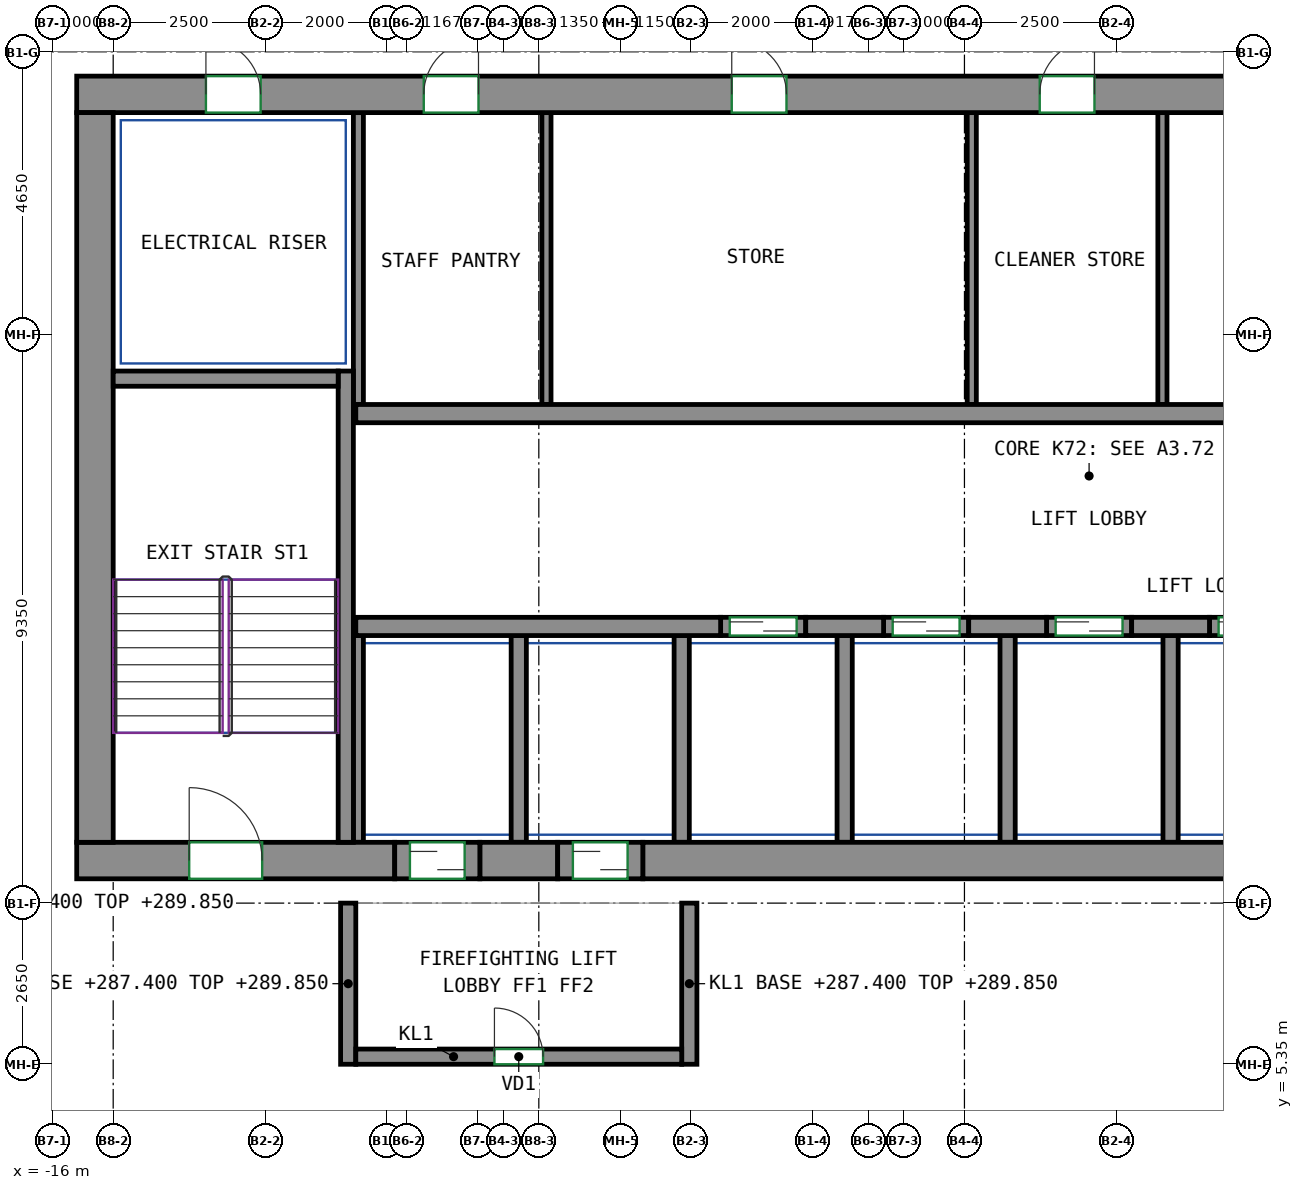
"""IFC4 building model, lengths in metres.
Left out: names, types, materials, properties, quantities, classifications, styles, units other than length and angle.
Written with IfcOpenShell. Run it as: python <this file> out.ifc"""

import sys

from ifc_helpers import new_model, si_unit, direction, frame, frame_2d, origin, place, context, subcontext, project, spatial, rectangle, extrude, source, transform, mapped, element, fill, save


model = new_model("IFC4")
c1 = context("Model", 3, precision=1e-05, world=origin(), true_north=direction((0.0, 1.0)))
c2 = subcontext(c1, "Body", "Model", "MODEL_VIEW")
j1 = project(units=[si_unit("LENGTHUNIT", "METRE"), si_unit("PLANEANGLEUNIT", "RADIAN")], contexts=[c1])
p1 = place(None, origin())
s1 = spatial("IfcSite", under=j1, at=p1, CompositionType="ELEMENT")
p2 = place(p1, origin())
s2 = spatial("IfcBuilding", under=s1, at=p2, CompositionType="ELEMENT")
p3 = place(p2, frame((0.0, 0.0, 287.4)))
s3 = spatial("IfcBuildingStorey", under=s2, at=p3, CompositionType="ELEMENT", Elevation=287.4)
m1 = source(origin(), c2, "Body", "SweptSolid", [
    extrude(rectangle(XDim=5.23, YDim=0.6, at=frame_2d((2.615, 0.0))), origin(), (0.0, 0.0, 1.0), 3.0),
])
p4 = place(p3, frame((-15.6, 8.7, 0.0), z_axis=(0.0, 0.0, 1.0), x_axis=(1.0, 0.0, 0.0)))
e1 = element("IfcWall", 1, at=p4, inside=s3, PredefinedType="SHEAR", context=c2, shape_type="MappedRepresentation", body=[
    mapped(m1, transform((0.0, 0.0, 0.0))),
])
p5 = place(p4, frame((1.85, 0.0, 0.0)))
e2 = element("IfcOpeningElement", 2, at=p5, cuts=e1, PredefinedType="OPENING", context=c2, shape_type="SweptSolid", body=[
    extrude(rectangle(XDim=1.2, YDim=2.1, at=frame_2d((0.6, 1.05))), frame((0.0, 0.31, 0.0), z_axis=(0.0, -1.0, 0.0), x_axis=(1.0, 0.0, 0.0)), (0.0, 0.0, 1.0), 0.62),
])
m2 = source(origin(), c2, "Body", "SweptSolid", [
    extrude(rectangle(XDim=1.28, YDim=0.6, at=frame_2d((0.64, 0.0))), origin(), (0.0, 0.0, 1.0), 3.0),
])
p6 = place(p3, frame((-8.97, 8.7, 0.0), z_axis=(0.0, 0.0, 1.0), x_axis=(1.0, 0.0, 0.0)))
e3 = element("IfcWall", 3, at=p6, inside=s3, PredefinedType="SHEAR", context=c2, shape_type="MappedRepresentation", body=[
    mapped(m2, transform((0.0, 0.0, 0.0))),
])
m3 = source(origin(), c2, "Body", "SweptSolid", [
    extrude(rectangle(XDim=14.18, YDim=0.6, at=frame_2d((7.09, 0.0))), origin(), (0.0, 0.0, 1.0), 3.0),
])
p7 = place(p3, frame((-6.29, 8.7, 0.0), z_axis=(0.0, 0.0, 1.0), x_axis=(1.0, 0.0, 0.0)))
e4 = element("IfcWall", 4, at=p7, inside=s3, PredefinedType="SHEAR", context=c2, shape_type="MappedRepresentation", body=[
    mapped(m3, transform((0.0, 0.0, 0.0))),
])
m4 = source(origin(), c2, "Body", "SweptSolid", [
    extrude(rectangle(XDim=33.3, YDim=0.6, at=frame_2d((16.65, 0.0))), origin(), (0.0, 0.0, 1.0), 3.0),
])
p8 = place(p3, frame((-15.6, 21.3, 0.0), z_axis=(0.0, 0.0, 1.0), x_axis=(1.0, 0.0, 0.0)))
e5 = element("IfcWall", 5, at=p8, inside=s3, PredefinedType="SHEAR", context=c2, shape_type="MappedRepresentation", body=[
    mapped(m4, transform((0.0, 0.0, 0.0))),
])
p9 = place(p8, frame((5.708, 0.0, 0.0)))
e6 = element("IfcOpeningElement", 6, at=p9, cuts=e5, PredefinedType="OPENING", context=c2, shape_type="SweptSolid", body=[
    extrude(rectangle(XDim=0.9, YDim=2.1, at=frame_2d((0.45, 1.05))), frame((0.0, 0.31, 0.0), z_axis=(0.0, -1.0, 0.0), x_axis=(1.0, 0.0, 0.0)), (0.0, 0.0, 1.0), 0.62),
])
p10 = place(p8, frame((10.773, 0.0, 0.0)))
e7 = element("IfcOpeningElement", 7, at=p10, cuts=e5, PredefinedType="OPENING", context=c2, shape_type="SweptSolid", body=[
    extrude(rectangle(XDim=0.9, YDim=2.1, at=frame_2d((0.45, 1.05))), frame((0.0, 0.31, 0.0), z_axis=(0.0, -1.0, 0.0), x_axis=(1.0, 0.0, 0.0)), (0.0, 0.0, 1.0), 0.62),
])
p11 = place(p8, frame((15.838, 0.0, 0.0)))
e8 = element("IfcOpeningElement", 8, at=p11, cuts=e5, PredefinedType="OPENING", context=c2, shape_type="SweptSolid", body=[
    extrude(rectangle(XDim=0.9, YDim=2.1, at=frame_2d((0.45, 1.05))), frame((0.0, 0.31, 0.0), z_axis=(0.0, -1.0, 0.0), x_axis=(1.0, 0.0, 0.0)), (0.0, 0.0, 1.0), 0.62),
])
p12 = place(p8, frame((21.493, 0.0, 0.0)))
e9 = element("IfcOpeningElement", 9, at=p12, cuts=e5, PredefinedType="OPENING", context=c2, shape_type="SweptSolid", body=[
    extrude(rectangle(XDim=0.9, YDim=2.1, at=frame_2d((0.45, 1.05))), frame((0.0, 0.31, 0.0), z_axis=(0.0, -1.0, 0.0), x_axis=(1.0, 0.0, 0.0)), (0.0, 0.0, 1.0), 0.62),
])
p13 = place(p8, frame((26.92, 0.0, 0.0)))
e10 = element("IfcOpeningElement", 10, at=p13, cuts=e5, PredefinedType="OPENING", context=c2, shape_type="SweptSolid", body=[
    extrude(rectangle(XDim=0.9, YDim=2.1, at=frame_2d((0.45, 1.05))), frame((0.0, 0.31, 0.0), z_axis=(0.0, -1.0, 0.0), x_axis=(1.0, 0.0, 0.0)), (0.0, 0.0, 1.0), 0.62),
])
p14 = place(p8, frame((2.125, 0.0, 0.0)))
e11 = element("IfcOpeningElement", 11, at=p14, cuts=e5, PredefinedType="OPENING", context=c2, shape_type="SweptSolid", body=[
    extrude(rectangle(XDim=0.9, YDim=2.1, at=frame_2d((0.45, 1.05))), frame((0.0, 0.31, 0.0), z_axis=(0.0, -1.0, 0.0), x_axis=(1.0, 0.0, 0.0)), (0.0, 0.0, 1.0), 0.62),
])
p15 = place(p8, frame((30.275, 0.0, 0.0)))
e12 = element("IfcOpeningElement", 12, at=p15, cuts=e5, PredefinedType="OPENING", context=c2, shape_type="SweptSolid", body=[
    extrude(rectangle(XDim=0.9, YDim=2.1, at=frame_2d((0.45, 1.05))), frame((0.0, 0.31, 0.0), z_axis=(0.0, -1.0, 0.0), x_axis=(1.0, 0.0, 0.0)), (0.0, 0.0, 1.0), 0.62),
])
m5 = source(origin(), c2, "Body", "SweptSolid", [
    extrude(rectangle(XDim=12.0, YDim=0.6, at=frame_2d((6.0, 0.0))), origin(), (0.0, 0.0, 1.0), 3.0),
])
p16 = place(p3, frame((-15.3, 9.0, 0.0), z_axis=(0.0, 0.0, 1.0), x_axis=(0.0, 1.0, 0.0)))
e13 = element("IfcWall", 13, at=p16, inside=s3, PredefinedType="SHEAR", context=c2, shape_type="MappedRepresentation", body=[
    mapped(m5, transform((0.0, 0.0, 0.0))),
])
m6 = source(origin(), c2, "Body", "SweptSolid", [
    extrude(rectangle(XDim=7.75, YDim=0.25, at=frame_2d((3.875, 0.0))), origin(), (0.0, 0.0, 1.0), 3.0),
])
p17 = place(p3, frame((-11.175, 9.0, 0.0), z_axis=(0.0, 0.0, 1.0), x_axis=(0.0, 1.0, 0.0)))
e14 = element("IfcWall", 14, at=p17, inside=s3, PredefinedType="SHEAR", context=c2, shape_type="MappedRepresentation", body=[
    mapped(m6, transform((0.0, 0.0, 0.0))),
])
m7 = source(origin(), c2, "Body", "SweptSolid", [
    extrude(rectangle(XDim=3.7, YDim=0.25, at=frame_2d((1.85, 0.0))), origin(), (0.0, 0.0, 1.0), 3.0),
])
p18 = place(p3, frame((-15.0, 16.625, 0.0), z_axis=(0.0, 0.0, 1.0), x_axis=(1.0, 0.0, 0.0)))
e15 = element("IfcWall", 15, at=p18, inside=s3, PredefinedType="SHEAR", context=c2, shape_type="MappedRepresentation", body=[
    mapped(m7, transform((0.0, 0.0, 0.0))),
])
m8 = source(origin(), c2, "Body", "SweptSolid", [
    extrude(rectangle(XDim=6.0, YDim=0.3, at=frame_2d((3.0, 0.0))), origin(), (0.0, 0.0, 1.0), 3.0),
])
p19 = place(p3, frame((-11.01, 12.55, 0.0), z_axis=(0.0, 0.0, 1.0), x_axis=(1.0, 0.0, 0.0)))
e16 = element("IfcWall", 16, at=p19, inside=s3, PredefinedType="SHEAR", context=c2, shape_type="MappedRepresentation", body=[
    mapped(m8, transform((0.0, 0.0, 0.0))),
])
m9 = source(origin(), c2, "Body", "SweptSolid", [
    extrude(rectangle(XDim=1.28, YDim=0.3, at=frame_2d((0.64, 0.0))), origin(), (0.0, 0.0, 1.0), 3.0),
])
for number, where, z_axis, x_axis in (
    (17, (-3.61, 12.55, 0.0), (0.0, 0.0, 1.0), (1.0, 0.0, 0.0)),
    (18, (-0.93, 12.55, 0.0), (0.0, 0.0, 1.0), (1.0, 0.0, 0.0)),
    (19, (1.75, 12.55, 0.0), (0.0, 0.0, 1.0), (1.0, 0.0, 0.0)),
):
    element("IfcWall", number, at=place(p3, frame(where, z_axis=z_axis, x_axis=x_axis)), inside=s3, PredefinedType="SHEAR", context=c2, shape_type="MappedRepresentation", body=[
        mapped(m9, transform((0.0, 0.0, 0.0))),
    ])
m10 = source(origin(), c2, "Body", "SweptSolid", [
    extrude(rectangle(XDim=22.08, YDim=0.3, at=frame_2d((11.04, 0.0))), origin(), (0.0, 0.0, 1.0), 3.0),
])
p20 = place(p3, frame((-11.01, 16.05, 0.0), z_axis=(0.0, 0.0, 1.0), x_axis=(1.0, 0.0, 0.0)))
e20 = element("IfcWall", 20, at=p20, inside=s3, PredefinedType="SHEAR", context=c2, shape_type="MappedRepresentation", body=[
    mapped(m10, transform((0.0, 0.0, 0.0))),
])
m11 = source(origin(), c2, "Body", "SweptSolid", [
    extrude(rectangle(XDim=1.4, YDim=0.3, at=frame_2d((0.7, 0.0))), origin(), (0.0, 0.0, 1.0), 3.0),
])
p21 = place(p3, frame((-5.01, 12.55, 0.0), z_axis=(0.0, 0.0, 1.0), x_axis=(1.0, 0.0, 0.0)))
e21 = element("IfcWall", 21, at=p21, inside=s3, PredefinedType="PARTITIONING", context=c2, shape_type="MappedRepresentation", body=[
    mapped(m11, transform((0.0, 0.0, 0.0))),
])
p22 = place(p21, frame((0.15, 0.0, 0.0)))
e22 = element("IfcOpeningElement", 22, at=p22, cuts=e21, PredefinedType="OPENING", context=c2, shape_type="SweptSolid", body=[
    extrude(rectangle(XDim=1.1, YDim=2.1, at=frame_2d((0.55, 1.05))), frame((0.0, 0.16, 0.0), z_axis=(0.0, -1.0, 0.0), x_axis=(1.0, 0.0, 0.0)), (0.0, 0.0, 1.0), 0.32),
])
m12 = source(origin(), c2, "Body", "SweptSolid", [
    extrude(rectangle(XDim=1.4, YDim=0.3, at=frame_2d((0.7, 0.0))), origin(), (0.0, 0.0, 1.0), 3.0),
])
p23 = place(p3, frame((-2.33, 12.55, 0.0), z_axis=(0.0, 0.0, 1.0), x_axis=(1.0, 0.0, 0.0)))
e23 = element("IfcWall", 23, at=p23, inside=s3, PredefinedType="PARTITIONING", context=c2, shape_type="MappedRepresentation", body=[
    mapped(m12, transform((0.0, 0.0, 0.0))),
])
p24 = place(p23, frame((0.15, 0.0, 0.0)))
e24 = element("IfcOpeningElement", 24, at=p24, cuts=e23, PredefinedType="OPENING", context=c2, shape_type="SweptSolid", body=[
    extrude(rectangle(XDim=1.1, YDim=2.1, at=frame_2d((0.55, 1.05))), frame((0.0, 0.16, 0.0), z_axis=(0.0, -1.0, 0.0), x_axis=(1.0, 0.0, 0.0)), (0.0, 0.0, 1.0), 0.32),
])
p25 = place(p3, frame((0.35, 12.55, 0.0), z_axis=(0.0, 0.0, 1.0), x_axis=(1.0, 0.0, 0.0)))
e25 = element("IfcWall", 25, at=p25, inside=s3, PredefinedType="PARTITIONING", context=c2, shape_type="MappedRepresentation", body=[
    mapped(m11, transform((0.0, 0.0, 0.0))),
])
p26 = place(p25, frame((0.15, 0.0, 0.0)))
e26 = element("IfcOpeningElement", 26, at=p26, cuts=e25, PredefinedType="OPENING", context=c2, shape_type="SweptSolid", body=[
    extrude(rectangle(XDim=1.1, YDim=2.1, at=frame_2d((0.55, 1.05))), frame((0.0, 0.16, 0.0), z_axis=(0.0, -1.0, 0.0), x_axis=(1.0, 0.0, 0.0)), (0.0, 0.0, 1.0), 0.32),
])
p27 = place(p3, frame((3.03, 12.55, 0.0), z_axis=(0.0, 0.0, 1.0), x_axis=(1.0, 0.0, 0.0)))
e27 = element("IfcWall", 27, at=p27, inside=s3, PredefinedType="PARTITIONING", context=c2, shape_type="MappedRepresentation", body=[
    mapped(m11, transform((0.0, 0.0, 0.0))),
])
p28 = place(p27, frame((0.15, 0.0, 0.0)))
e28 = element("IfcOpeningElement", 28, at=p28, cuts=e27, PredefinedType="OPENING", context=c2, shape_type="SweptSolid", body=[
    extrude(rectangle(XDim=1.1, YDim=2.1, at=frame_2d((0.55, 1.05))), frame((0.0, 0.16, 0.0), z_axis=(0.0, -1.0, 0.0), x_axis=(1.0, 0.0, 0.0)), (0.0, 0.0, 1.0), 0.32),
])
m13 = source(origin(), c2, "Body", "SweptSolid", [
    extrude(rectangle(XDim=2.65, YDim=0.25, at=frame_2d((1.325, 0.0))), origin(), (0.0, 0.0, 1.0), 2.45),
])
for number, where, z_axis, x_axis in (
    (29, (-11.135, 5.35, 0.0), (0.0, 0.0, 1.0), (0.0, 1.0, 0.0)),
    (30, (-5.525, 5.35, 0.0), (0.0, 0.0, 1.0), (0.0, 1.0, 0.0)),
):
    element("IfcWall", number, at=place(p3, frame(where, z_axis=z_axis, x_axis=x_axis)), inside=s3, PredefinedType="PARTITIONING", context=c2, shape_type="MappedRepresentation", body=[
        mapped(m13, transform((0.0, 0.0, 0.0))),
    ])
m14 = source(origin(), c2, "Body", "SweptSolid", [
    extrude(rectangle(XDim=5.36, YDim=0.25, at=frame_2d((2.68, 0.0))), origin(), (0.0, 0.0, 1.0), 3.0),
])
p29 = place(p3, frame((-11.01, 5.475, 0.0), z_axis=(0.0, 0.0, 1.0), x_axis=(1.0, 0.0, 0.0)))
e31 = element("IfcWall", 31, at=p29, inside=s3, PredefinedType="PARTITIONING", context=c2, shape_type="MappedRepresentation", body=[
    mapped(m14, transform((0.0, 0.0, 0.0))),
])
p30 = place(p29, frame((2.28, 0.0, 0.0)))
e32 = element("IfcOpeningElement", 32, at=p30, cuts=e31, PredefinedType="OPENING", context=c2, shape_type="SweptSolid", body=[
    extrude(rectangle(XDim=0.8, YDim=2.0, at=frame_2d((0.4, 1.0))), frame((0.0, 0.135, 0.0), z_axis=(0.0, -1.0, 0.0), x_axis=(1.0, 0.0, 0.0)), (0.0, 0.0, 1.0), 0.27),
])
m15 = source(origin(), c2, "Body", "SweptSolid", [
    extrude(rectangle(XDim=4.8, YDim=0.165, at=frame_2d((2.4, 0.0))), origin(), (0.0, 0.0, 1.0), 3.0),
])
p31 = place(p3, frame((-10.968, 16.2, 0.0), z_axis=(0.0, 0.0, 1.0), x_axis=(0.0, 1.0, 0.0)))
e33 = element("IfcWall", 33, at=p31, inside=s3, PredefinedType="PARTITIONING", context=c2, shape_type="MappedRepresentation", body=[
    mapped(m15, transform((0.0, 0.0, 0.0))),
])
m16 = source(origin(), c2, "Body", "SweptSolid", [
    extrude(rectangle(XDim=3.4, YDim=0.25, at=frame_2d((1.7, 0.0))), origin(), (0.0, 0.0, 1.0), 3.0),
])
for number, where, z_axis, x_axis in (
    (34, (2.39, 9.0, 0.0), (0.0, 0.0, 1.0), (0.0, 1.0, 0.0)),
    (35, (-0.29, 9.0, 0.0), (0.0, 0.0, 1.0), (0.0, 1.0, 0.0)),
):
    element("IfcWall", number, at=place(p3, frame(where, z_axis=z_axis, x_axis=x_axis)), inside=s3, PredefinedType="PARTITIONING", context=c2, shape_type="MappedRepresentation", body=[
        mapped(m16, transform((0.0, 0.0, 0.0))),
    ])
m17 = source(origin(), c2, "Body", "SweptSolid", [
    extrude(rectangle(XDim=3.4, YDim=0.165, at=frame_2d((1.7, 0.0))), origin(), (0.0, 0.0, 1.0), 3.0),
])
p32 = place(p3, frame((-10.968, 9.0, 0.0), z_axis=(0.0, 0.0, 1.0), x_axis=(0.0, 1.0, 0.0)))
e36 = element("IfcWall", 36, at=p32, inside=s3, PredefinedType="PARTITIONING", context=c2, shape_type="MappedRepresentation", body=[
    mapped(m17, transform((0.0, 0.0, 0.0))),
])
for number, where, z_axis, x_axis in (
    (37, (-2.97, 9.0, 0.0), (0.0, 0.0, 1.0), (0.0, 1.0, 0.0)),
    (38, (-5.65, 9.0, 0.0), (0.0, 0.0, 1.0), (0.0, 1.0, 0.0)),
    (39, (-8.33, 9.0, 0.0), (0.0, 0.0, 1.0), (0.0, 1.0, 0.0)),
):
    element("IfcWall", number, at=place(p3, frame(where, z_axis=z_axis, x_axis=x_axis)), inside=s3, PredefinedType="PARTITIONING", context=c2, shape_type="MappedRepresentation", body=[
        mapped(m16, transform((0.0, 0.0, 0.0))),
    ])
m18 = source(origin(), c2, "Body", "SweptSolid", [
    extrude(rectangle(XDim=4.8, YDim=0.15, at=frame_2d((2.4, 0.0))), origin(), (0.0, 0.0, 1.0), 3.0),
])
for number, where, z_axis, x_axis in (
    (40, (-7.875, 16.2, 0.0), (0.0, 0.0, 1.0), (0.0, 1.0, 0.0)),
    (41, (-0.88, 16.2, 0.0), (0.0, 0.0, 1.0), (0.0, 1.0, 0.0)),
    (42, (2.256, 16.2, 0.0), (0.0, 0.0, 1.0), (0.0, 1.0, 0.0)),
):
    element("IfcWall", number, at=place(p3, frame(where, z_axis=z_axis, x_axis=x_axis)), inside=s3, PredefinedType="PARTITIONING", context=c2, shape_type="MappedRepresentation", body=[
        mapped(m18, transform((0.0, 0.0, 0.0))),
    ])
m19 = source(origin(), c2, "Body", "SweptSolid", [
    extrude(rectangle(XDim=1.4, YDim=0.6, at=frame_2d((0.7, 0.0))), origin(), (0.0, 0.0, 1.0), 2.7),
])
p33 = place(p3, frame((-10.37, 8.7, 0.0), z_axis=(0.0, 0.0, 1.0), x_axis=(1.0, 0.0, 0.0)))
e43 = element("IfcWall", 43, at=p33, inside=s3, PredefinedType="PARTITIONING", context=c2, shape_type="MappedRepresentation", body=[
    mapped(m19, transform((0.0, 0.0, 0.0))),
])
p34 = place(p33, frame((0.25, 0.0, 0.0)))
e44 = element("IfcOpeningElement", 44, at=p34, cuts=e43, PredefinedType="OPENING", context=c2, shape_type="SweptSolid", body=[
    extrude(rectangle(XDim=0.9, YDim=2.1, at=frame_2d((0.45, 1.05))), frame((0.0, 0.31, 0.0), z_axis=(0.0, -1.0, 0.0), x_axis=(1.0, 0.0, 0.0)), (0.0, 0.0, 1.0), 0.62),
])
m20 = source(origin(), c2, "Body", "SweptSolid", [
    extrude(rectangle(XDim=1.4, YDim=0.6, at=frame_2d((0.7, 0.0))), origin(), (0.0, 0.0, 1.0), 2.7),
])
p35 = place(p3, frame((-7.69, 8.7, 0.0), z_axis=(0.0, 0.0, 1.0), x_axis=(1.0, 0.0, 0.0)))
e45 = element("IfcWall", 45, at=p35, inside=s3, PredefinedType="PARTITIONING", context=c2, shape_type="MappedRepresentation", body=[
    mapped(m20, transform((0.0, 0.0, 0.0))),
])
p36 = place(p35, frame((0.25, 0.0, 0.0)))
e46 = element("IfcOpeningElement", 46, at=p36, cuts=e45, PredefinedType="OPENING", context=c2, shape_type="SweptSolid", body=[
    extrude(rectangle(XDim=0.9, YDim=2.1, at=frame_2d((0.45, 1.05))), frame((0.0, 0.31, 0.0), z_axis=(0.0, -1.0, 0.0), x_axis=(1.0, 0.0, 0.0)), (0.0, 0.0, 1.0), 0.62),
])
p37 = place(p30, origin())
e47 = element("IfcDoor", 47, at=p37, inside=s3, OperationType="SINGLE_SWING_LEFT", PredefinedType="DOOR", context=c2, shape_type="SweptSolid", body=[
    extrude(rectangle(XDim=0.8, YDim=2.0, at=frame_2d((0.4, 1.0))), frame((0.0, 0.025, 0.0), z_axis=(0.0, -1.0, 0.0), x_axis=(1.0, 0.0, 0.0)), (0.0, 0.0, 1.0), 0.05),
])
fill(e32, e47)
p38 = place(p34, origin())
e48 = element("IfcDoor", 48, at=p38, inside=s3, OperationType="SLIDING_TO_LEFT", PredefinedType="DOOR", context=c2, shape_type="SweptSolid", body=[
    extrude(rectangle(XDim=0.9, YDim=2.1, at=frame_2d((0.45, 1.05))), frame((0.0, 0.205, 0.0), z_axis=(0.0, -1.0, 0.0), x_axis=(1.0, 0.0, 0.0)), (0.0, 0.0, 1.0), 0.05),
])
fill(e44, e48)
p39 = place(p36, origin())
e49 = element("IfcDoor", 49, at=p39, inside=s3, OperationType="SLIDING_TO_RIGHT", PredefinedType="DOOR", context=c2, shape_type="SweptSolid", body=[
    extrude(rectangle(XDim=0.9, YDim=2.1, at=frame_2d((0.45, 1.05))), frame((0.0, 0.205, 0.0), z_axis=(0.0, -1.0, 0.0), x_axis=(1.0, 0.0, 0.0)), (0.0, 0.0, 1.0), 0.05),
])
fill(e46, e49)
p40 = place(p22, origin())
e50 = element("IfcDoor", 50, at=p40, inside=s3, OperationType="DOUBLE_DOOR_SLIDING", PredefinedType="DOOR", context=c2, shape_type="SweptSolid", body=[
    extrude(rectangle(XDim=1.1, YDim=2.1, at=frame_2d((0.55, 1.05))), frame((0.0, 0.025, 0.0), z_axis=(0.0, -1.0, 0.0), x_axis=(1.0, 0.0, 0.0)), (0.0, 0.0, 1.0), 0.05),
])
fill(e22, e50)
p41 = place(p24, origin())
e51 = element("IfcDoor", 51, at=p41, inside=s3, OperationType="DOUBLE_DOOR_SLIDING", PredefinedType="DOOR", context=c2, shape_type="SweptSolid", body=[
    extrude(rectangle(XDim=1.1, YDim=2.1, at=frame_2d((0.55, 1.05))), frame((0.0, 0.025, 0.0), z_axis=(0.0, -1.0, 0.0), x_axis=(1.0, 0.0, 0.0)), (0.0, 0.0, 1.0), 0.05),
])
fill(e24, e51)
p42 = place(p26, origin())
e52 = element("IfcDoor", 52, at=p42, inside=s3, OperationType="DOUBLE_DOOR_SLIDING", PredefinedType="DOOR", context=c2, shape_type="SweptSolid", body=[
    extrude(rectangle(XDim=1.1, YDim=2.1, at=frame_2d((0.55, 1.05))), frame((0.0, 0.025, 0.0), z_axis=(0.0, -1.0, 0.0), x_axis=(1.0, 0.0, 0.0)), (0.0, 0.0, 1.0), 0.05),
])
fill(e26, e52)
p43 = place(p28, origin())
e53 = element("IfcDoor", 53, at=p43, inside=s3, OperationType="DOUBLE_DOOR_SLIDING", PredefinedType="DOOR", context=c2, shape_type="SweptSolid", body=[
    extrude(rectangle(XDim=1.1, YDim=2.1, at=frame_2d((0.55, 1.05))), frame((0.0, 0.025, 0.0), z_axis=(0.0, -1.0, 0.0), x_axis=(1.0, 0.0, 0.0)), (0.0, 0.0, 1.0), 0.05),
])
fill(e28, e53)
p44 = place(p9, origin())
e54 = element("IfcDoor", 54, at=p44, inside=s3, OperationType="SINGLE_SWING_RIGHT", PredefinedType="DOOR", context=c2, shape_type="SweptSolid", body=[
    extrude(rectangle(XDim=0.9, YDim=2.1, at=frame_2d((0.45, 1.05))), frame((0.0, -0.155, 0.0), z_axis=(0.0, -1.0, 0.0), x_axis=(1.0, 0.0, 0.0)), (0.0, 0.0, 1.0), 0.05),
])
fill(e6, e54)
p45 = place(p10, origin())
e55 = element("IfcDoor", 55, at=p45, inside=s3, OperationType="SINGLE_SWING_LEFT", PredefinedType="DOOR", context=c2, shape_type="SweptSolid", body=[
    extrude(rectangle(XDim=0.9, YDim=2.1, at=frame_2d((0.45, 1.05))), frame((0.0, -0.155, 0.0), z_axis=(0.0, -1.0, 0.0), x_axis=(1.0, 0.0, 0.0)), (0.0, 0.0, 1.0), 0.05),
])
fill(e7, e55)
p46 = place(p11, origin())
e56 = element("IfcDoor", 56, at=p46, inside=s3, OperationType="SINGLE_SWING_RIGHT", PredefinedType="DOOR", context=c2, shape_type="SweptSolid", body=[
    extrude(rectangle(XDim=0.9, YDim=2.1, at=frame_2d((0.45, 1.05))), frame((0.0, -0.155, 0.0), z_axis=(0.0, -1.0, 0.0), x_axis=(1.0, 0.0, 0.0)), (0.0, 0.0, 1.0), 0.05),
])
fill(e8, e56)
p47 = place(p14, origin())
e57 = element("IfcDoor", 57, at=p47, inside=s3, OperationType="SINGLE_SWING_LEFT", PredefinedType="DOOR", context=c2, shape_type="SweptSolid", body=[
    extrude(rectangle(XDim=0.9, YDim=2.1, at=frame_2d((0.45, 1.05))), frame((0.0, -0.155, 0.0), z_axis=(0.0, -1.0, 0.0), x_axis=(1.0, 0.0, 0.0)), (0.0, 0.0, 1.0), 0.05),
])
fill(e11, e57)
p48 = place(p5, origin())
e58 = element("IfcDoor", 58, at=p48, inside=s3, OperationType="DOUBLE_DOOR_SINGLE_SWING", PredefinedType="DOOR", context=c2, shape_type="SweptSolid", body=[
    extrude(rectangle(XDim=1.2, YDim=2.1, at=frame_2d((0.6, 1.05))), frame((0.0, 0.205, 0.0), z_axis=(0.0, -1.0, 0.0), x_axis=(1.0, 0.0, 0.0)), (0.0, 0.0, 1.0), 0.05),
])
fill(e2, e58)
save(model, sys.argv[1])
